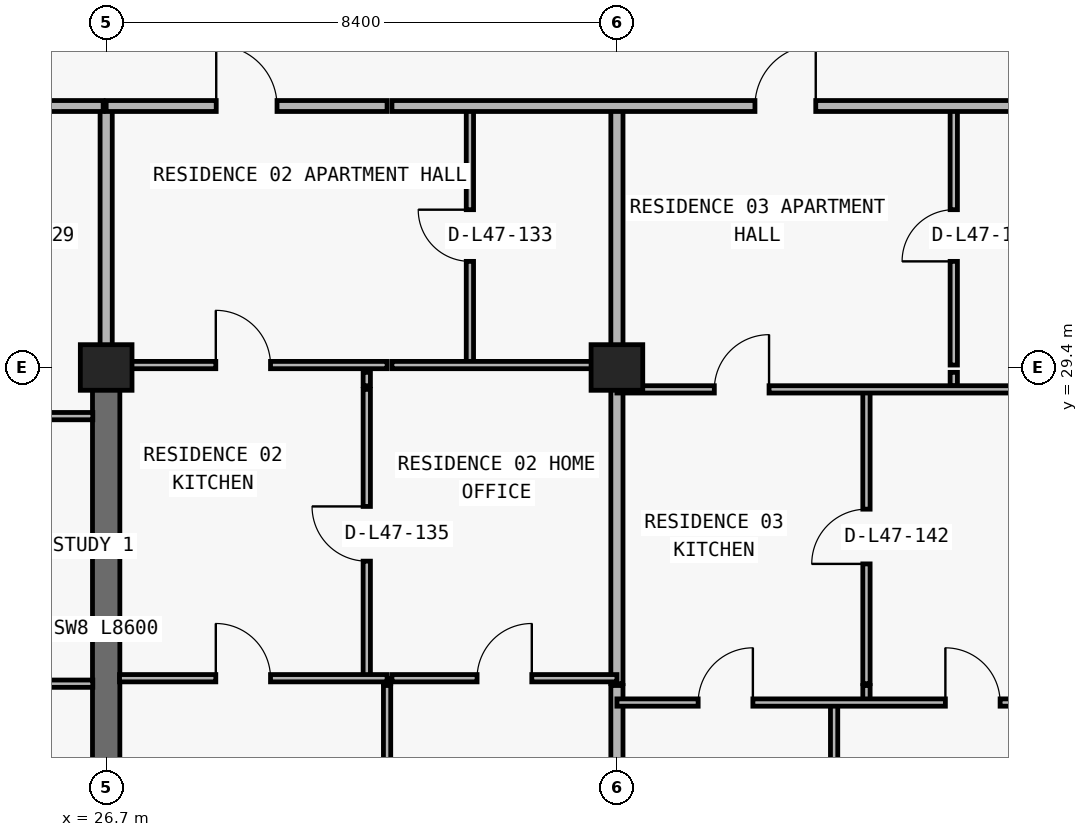
"""IFC4 building model, lengths in metres.
Left out: names, types, materials, properties, quantities, classifications, styles, units other than length and angle.
Written with IfcOpenShell. Run it as: python <this file> out.ifc"""

import sys

from ifc_helpers import new_model, si_unit, direction, frame, frame_2d, origin, origin_2d, place, context, subcontext, project, spatial, rectangle, extrude, element, fill, save


model = new_model("IFC4")
c1 = context("Model", 3, precision=1e-05, world=origin(), true_north=direction((0.0, 1.0)))
c2 = subcontext(c1, "Body", "Model", "MODEL_VIEW")
j1 = project(units=[si_unit("LENGTHUNIT", "METRE"), si_unit("PLANEANGLEUNIT", "RADIAN")], contexts=[c1])
p1 = place(None, origin())
s1 = spatial("IfcSite", under=j1, at=p1, CompositionType="ELEMENT")
p2 = place(p1, origin())
s2 = spatial("IfcBuilding", under=s1, at=p2, CompositionType="ELEMENT")
p3 = place(p2, frame((0.0, 0.0, 170.4)))
s3 = spatial("IfcBuildingStorey", under=s2, at=p3, CompositionType="ELEMENT", Elevation=170.4)
for number, where, z_axis, x_axis in (
    (1, (26.7, 29.4, 0.0), (0.0, 0.0, 1.0), (1.0, 0.0, 0.0)),
    (2, (35.1, 29.4, 0.0), (0.0, 0.0, 1.0), (1.0, 0.0, 0.0)),
):
    element("IfcColumn", number, at=place(p3, frame(where, z_axis=z_axis, x_axis=x_axis)), inside=s3, PredefinedType="COLUMN", context=c2, shape_type="SweptSolid", body=[
        extrude(rectangle(XDim=0.85, YDim=0.75, at=origin_2d()), origin(), (0.0, 0.0, 1.0), 3.05),
    ])
p4 = place(p3, frame((26.7, 20.8, 0.0), z_axis=(0.0, 0.0, 1.0), x_axis=(0.0, 1.0, 0.0)))
e3 = element("IfcWall", 3, at=p4, inside=s3, PredefinedType="SHEAR", context=c2, shape_type="SweptSolid", body=[
    extrude(rectangle(XDim=8.6, YDim=0.45, at=frame_2d((4.3, 0.0))), origin(), (0.0, 0.0, 1.0), 3.05),
])
p5 = place(p3, frame((26.7, 29.44, 0.0), z_axis=(0.0, 0.0, 1.0), x_axis=(0.0, 1.0, 0.0)))
e4 = element("IfcWall", 4, at=p5, inside=s3, PredefinedType="PARTITIONING", context=c2, shape_type="SweptSolid", body=[
    extrude(rectangle(XDim=4.26, YDim=0.2, at=frame_2d((2.13, 0.0))), origin(), (0.0, 0.0, 1.0), 2.335),
])
p6 = place(p3, frame((30.986, 24.29, 0.0), z_axis=(0.0, 0.0, 1.0), x_axis=(0.0, 1.0, 0.0)))
e5 = element("IfcWall", 5, at=p6, inside=s3, PredefinedType="PARTITIONING", context=c2, shape_type="SweptSolid", body=[
    extrude(rectangle(XDim=4.75, YDim=0.12, at=frame_2d((2.375, 0.0))), origin(), (0.0, 0.0, 1.0), 2.725),
])
p7 = place(p6, frame((1.925, 0.0, 0.0)))
e6 = element("IfcOpeningElement", 6, at=p7, cuts=e5, PredefinedType="OPENING", context=c2, shape_type="SweptSolid", body=[
    extrude(rectangle(XDim=0.9, YDim=2.15, at=frame_2d((0.45, 1.075))), frame((0.0, 0.07, 0.0), z_axis=(0.0, -1.0, 0.0), x_axis=(1.0, 0.0, 0.0)), (0.0, 0.0, 1.0), 0.14),
])
p8 = place(p3, frame((30.986, 29.1, 0.0), z_axis=(0.0, 0.0, 1.0), x_axis=(0.0, 1.0, 0.0)))
e7 = element("IfcWall", 7, at=p8, inside=s3, PredefinedType="PARTITIONING", context=c2, shape_type="SweptSolid", body=[
    extrude(rectangle(XDim=0.22, YDim=0.12, at=frame_2d((0.11, 0.0))), origin(), (0.0, 0.0, 1.0), 2.725),
])
p9 = place(p3, frame((31.32, 11.24, 0.0), z_axis=(0.0, 0.0, 1.0), x_axis=(0.0, 1.0, 0.0)))
e8 = element("IfcWall", 8, at=p9, inside=s3, PredefinedType="PARTITIONING", context=c2, shape_type="SweptSolid", body=[
    extrude(rectangle(XDim=12.93, YDim=0.12, at=frame_2d((6.465, 0.0))), origin(), (0.0, 0.0, 1.0), 3.05),
])
p10 = place(p3, frame((31.32, 24.2, 0.0), z_axis=(0.0, 0.0, 1.0), x_axis=(0.0, 1.0, 0.0)))
e9 = element("IfcWall", 9, at=p10, inside=s3, PredefinedType="PARTITIONING", context=c2, shape_type="SweptSolid", body=[
    extrude(rectangle(XDim=0.09, YDim=0.12, at=frame_2d((0.045, 0.0))), origin(), (0.0, 0.0, 1.0), 3.05),
])
p11 = place(p3, frame((32.682, 29.44, 0.0), z_axis=(0.0, 0.0, 1.0), x_axis=(0.0, 1.0, 0.0)))
e10 = element("IfcWall", 10, at=p11, inside=s3, PredefinedType="PARTITIONING", context=c2, shape_type="SweptSolid", body=[
    extrude(rectangle(XDim=4.26, YDim=0.12, at=frame_2d((2.13, 0.0))), origin(), (0.0, 0.0, 1.0), 3.05),
])
p12 = place(p11, frame((1.705, 0.0, 0.0)))
e11 = element("IfcOpeningElement", 11, at=p12, cuts=e10, PredefinedType="OPENING", context=c2, shape_type="SweptSolid", body=[
    extrude(rectangle(XDim=0.85, YDim=2.1, at=frame_2d((0.425, 1.05))), frame((0.0, 0.07, 0.0), z_axis=(0.0, -1.0, 0.0), x_axis=(1.0, 0.0, 0.0)), (0.0, 0.0, 1.0), 0.14),
])
p13 = place(p3, frame((35.1, 11.24, 0.0), z_axis=(0.0, 0.0, 1.0), x_axis=(0.0, 1.0, 0.0)))
e12 = element("IfcWall", 12, at=p13, inside=s3, PredefinedType="PARTITIONING", context=c2, shape_type="SweptSolid", body=[
    extrude(rectangle(XDim=12.93, YDim=0.2, at=frame_2d((6.465, 0.0))), origin(), (0.0, 0.0, 1.0), 2.263),
])
p14 = place(p3, frame((35.1, 24.2, 0.0), z_axis=(0.0, 0.0, 1.0), x_axis=(0.0, 1.0, 0.0)))
e13 = element("IfcWall", 13, at=p14, inside=s3, PredefinedType="PARTITIONING", context=c2, shape_type="SweptSolid", body=[
    extrude(rectangle(XDim=4.84, YDim=0.2, at=frame_2d((2.42, 0.0))), origin(), (0.0, 0.0, 1.0), 2.263),
])
p15 = place(p3, frame((35.1, 29.1, 0.0), z_axis=(0.0, 0.0, 1.0), x_axis=(0.0, 1.0, 0.0)))
e14 = element("IfcWall", 14, at=p15, inside=s3, PredefinedType="PARTITIONING", context=c2, shape_type="SweptSolid", body=[
    extrude(rectangle(XDim=0.22, YDim=0.2, at=frame_2d((0.11, 0.0))), origin(), (0.0, 0.0, 1.0), 3.05),
])
p16 = place(p3, frame((35.1, 29.44, 0.0), z_axis=(0.0, 0.0, 1.0), x_axis=(0.0, 1.0, 0.0)))
e15 = element("IfcWall", 15, at=p16, inside=s3, PredefinedType="PARTITIONING", context=c2, shape_type="SweptSolid", body=[
    extrude(rectangle(XDim=4.26, YDim=0.2, at=frame_2d((2.13, 0.0))), origin(), (0.0, 0.0, 1.0), 2.263),
])
p17 = place(p3, frame((38.672, 11.24, 0.0), z_axis=(0.0, 0.0, 1.0), x_axis=(0.0, 1.0, 0.0)))
e16 = element("IfcWall", 16, at=p17, inside=s3, PredefinedType="PARTITIONING", context=c2, shape_type="SweptSolid", body=[
    extrude(rectangle(XDim=12.65, YDim=0.12, at=frame_2d((6.325, 0.0))), origin(), (0.0, 0.0, 1.0), 3.05),
])
p18 = place(p3, frame((39.204, 23.89, 0.0), z_axis=(0.0, 0.0, 1.0), x_axis=(0.0, 1.0, 0.0)))
e17 = element("IfcWall", 17, at=p18, inside=s3, PredefinedType="PARTITIONING", context=c2, shape_type="SweptSolid", body=[
    extrude(rectangle(XDim=0.28, YDim=0.12, at=frame_2d((0.14, 0.0))), origin(), (0.0, 0.0, 1.0), 3.05),
])
p19 = place(p3, frame((39.204, 24.2, 0.0), z_axis=(0.0, 0.0, 1.0), x_axis=(0.0, 1.0, 0.0)))
e18 = element("IfcWall", 18, at=p19, inside=s3, PredefinedType="PARTITIONING", context=c2, shape_type="SweptSolid", body=[
    extrude(rectangle(XDim=4.84, YDim=0.12, at=frame_2d((2.42, 0.0))), origin(), (0.0, 0.0, 1.0), 3.05),
])
p20 = place(p19, frame((1.97, 0.0, 0.0)))
e19 = element("IfcOpeningElement", 19, at=p20, cuts=e18, PredefinedType="OPENING", context=c2, shape_type="SweptSolid", body=[
    extrude(rectangle(XDim=0.9, YDim=2.15, at=frame_2d((0.45, 1.075))), frame((0.0, 0.07, 0.0), z_axis=(0.0, -1.0, 0.0), x_axis=(1.0, 0.0, 0.0)), (0.0, 0.0, 1.0), 0.14),
])
p21 = place(p3, frame((40.64, 29.1, 0.0), z_axis=(0.0, 0.0, 1.0), x_axis=(0.0, 1.0, 0.0)))
e20 = element("IfcWall", 20, at=p21, inside=s3, PredefinedType="PARTITIONING", context=c2, shape_type="SweptSolid", body=[
    extrude(rectangle(XDim=0.22, YDim=0.12, at=frame_2d((0.11, 0.0))), origin(), (0.0, 0.0, 1.0), 3.05),
])
p22 = place(p3, frame((40.64, 29.44, 0.0), z_axis=(0.0, 0.0, 1.0), x_axis=(0.0, 1.0, 0.0)))
e21 = element("IfcWall", 21, at=p22, inside=s3, PredefinedType="PARTITIONING", context=c2, shape_type="SweptSolid", body=[
    extrude(rectangle(XDim=4.26, YDim=0.12, at=frame_2d((2.13, 0.0))), origin(), (0.0, 0.0, 1.0), 3.05),
])
p23 = place(p22, frame((1.705, 0.0, 0.0)))
e22 = element("IfcOpeningElement", 22, at=p23, cuts=e21, PredefinedType="OPENING", context=c2, shape_type="SweptSolid", body=[
    extrude(rectangle(XDim=0.85, YDim=2.1, at=frame_2d((0.425, 1.05))), frame((0.0, 0.07, 0.0), z_axis=(0.0, -1.0, 0.0), x_axis=(1.0, 0.0, 0.0)), (0.0, 0.0, 1.0), 0.14),
])
p24 = place(p3, frame((35.1, 23.89, 0.0), z_axis=(0.0, 0.0, 1.0), x_axis=(1.0, 0.0, 0.0)))
e23 = element("IfcWall", 23, at=p24, inside=s3, PredefinedType="PARTITIONING", context=c2, shape_type="SweptSolid", body=[
    extrude(rectangle(XDim=7.6, YDim=0.12, at=frame_2d((3.8, 0.0))), origin(), (0.0, 0.0, 1.0), 3.05),
])
p25 = place(p24, frame((1.336, 0.0, 0.0)))
e24 = element("IfcOpeningElement", 24, at=p25, cuts=e23, PredefinedType="OPENING", context=c2, shape_type="SweptSolid", body=[
    extrude(rectangle(XDim=0.9, YDim=2.15, at=frame_2d((0.45, 1.075))), frame((0.0, 0.07, 0.0), z_axis=(0.0, -1.0, 0.0), x_axis=(1.0, 0.0, 0.0)), (0.0, 0.0, 1.0), 0.14),
])
p26 = place(p24, frame((5.402, 0.0, 0.0)))
e25 = element("IfcOpeningElement", 25, at=p26, cuts=e23, PredefinedType="OPENING", context=c2, shape_type="SweptSolid", body=[
    extrude(rectangle(XDim=0.9, YDim=2.15, at=frame_2d((0.45, 1.075))), frame((0.0, 0.07, 0.0), z_axis=(0.0, -1.0, 0.0), x_axis=(1.0, 0.0, 0.0)), (0.0, 0.0, 1.0), 0.14),
])
p27 = place(p3, frame((18.3, 24.2, 0.0), z_axis=(0.0, 0.0, 1.0), x_axis=(1.0, 0.0, 0.0)))
e26 = element("IfcWall", 26, at=p27, inside=s3, PredefinedType="PARTITIONING", context=c2, shape_type="SweptSolid", body=[
    extrude(rectangle(XDim=8.18, YDim=0.12, at=frame_2d((4.09, 0.0))), origin(), (0.0, 0.0, 1.0), 3.05),
])
p28 = place(p27, frame((3.64, 0.0, 0.0)))
e27 = element("IfcOpeningElement", 27, at=p28, cuts=e26, PredefinedType="OPENING", context=c2, shape_type="SweptSolid", body=[
    extrude(rectangle(XDim=0.9, YDim=2.15, at=frame_2d((0.45, 1.075))), frame((0.0, 0.07, 0.0), z_axis=(0.0, -1.0, 0.0), x_axis=(1.0, 0.0, 0.0)), (0.0, 0.0, 1.0), 0.14),
])
p29 = place(p3, frame((26.92, 24.29, 0.0), z_axis=(0.0, 0.0, 1.0), x_axis=(1.0, 0.0, 0.0)))
e28 = element("IfcWall", 28, at=p29, inside=s3, PredefinedType="PARTITIONING", context=c2, shape_type="SweptSolid", body=[
    extrude(rectangle(XDim=4.4, YDim=0.12, at=frame_2d((2.2, 0.0))), origin(), (0.0, 0.0, 1.0), 3.05),
])
p30 = place(p29, frame((1.583, 0.0, 0.0)))
e29 = element("IfcOpeningElement", 29, at=p30, cuts=e28, PredefinedType="OPENING", context=c2, shape_type="SweptSolid", body=[
    extrude(rectangle(XDim=0.9, YDim=2.15, at=frame_2d((0.45, 1.075))), frame((0.0, 0.07, 0.0), z_axis=(0.0, -1.0, 0.0), x_axis=(1.0, 0.0, 0.0)), (0.0, 0.0, 1.0), 0.14),
])
p31 = place(p3, frame((31.4, 24.29, 0.0), z_axis=(0.0, 0.0, 1.0), x_axis=(1.0, 0.0, 0.0)))
e30 = element("IfcWall", 30, at=p31, inside=s3, PredefinedType="PARTITIONING", context=c2, shape_type="SweptSolid", body=[
    extrude(rectangle(XDim=3.7, YDim=0.12, at=frame_2d((1.85, 0.0))), origin(), (0.0, 0.0, 1.0), 3.05),
])
p32 = place(p31, frame((1.4, 0.0, 0.0)))
e31 = element("IfcOpeningElement", 31, at=p32, cuts=e30, PredefinedType="OPENING", context=c2, shape_type="SweptSolid", body=[
    extrude(rectangle(XDim=0.9, YDim=2.15, at=frame_2d((0.45, 1.075))), frame((0.0, 0.07, 0.0), z_axis=(0.0, -1.0, 0.0), x_axis=(1.0, 0.0, 0.0)), (0.0, 0.0, 1.0), 0.14),
])
p33 = place(p3, frame((18.3, 28.6, 0.0), z_axis=(0.0, 0.0, 1.0), x_axis=(1.0, 0.0, 0.0)))
e32 = element("IfcWall", 32, at=p33, inside=s3, PredefinedType="PARTITIONING", context=c2, shape_type="SweptSolid", body=[
    extrude(rectangle(XDim=8.18, YDim=0.12, at=frame_2d((4.09, 0.0))), origin(), (0.0, 0.0, 1.0), 3.05),
])
p34 = place(p33, frame((2.809, 0.0, 0.0)))
e33 = element("IfcOpeningElement", 33, at=p34, cuts=e32, PredefinedType="OPENING", context=c2, shape_type="SweptSolid", body=[
    extrude(rectangle(XDim=0.9, YDim=2.15, at=frame_2d((0.45, 1.075))), frame((0.0, 0.07, 0.0), z_axis=(0.0, -1.0, 0.0), x_axis=(1.0, 0.0, 0.0)), (0.0, 0.0, 1.0), 0.14),
])
p35 = place(p3, frame((35.1, 29.04, 0.0), z_axis=(0.0, 0.0, 1.0), x_axis=(1.0, 0.0, 0.0)))
e34 = element("IfcWall", 34, at=p35, inside=s3, PredefinedType="PARTITIONING", context=c2, shape_type="SweptSolid", body=[
    extrude(rectangle(XDim=7.6, YDim=0.12, at=frame_2d((3.8, 0.0))), origin(), (0.0, 0.0, 1.0), 3.05),
])
p36 = place(p35, frame((1.602, 0.0, 0.0)))
e35 = element("IfcOpeningElement", 35, at=p36, cuts=e34, PredefinedType="OPENING", context=c2, shape_type="SweptSolid", body=[
    extrude(rectangle(XDim=0.9, YDim=2.15, at=frame_2d((0.45, 1.075))), frame((0.0, 0.07, 0.0), z_axis=(0.0, -1.0, 0.0), x_axis=(1.0, 0.0, 0.0)), (0.0, 0.0, 1.0), 0.14),
])
p37 = place(p3, frame((26.92, 29.44, 0.0), z_axis=(0.0, 0.0, 1.0), x_axis=(1.0, 0.0, 0.0)))
e36 = element("IfcWall", 36, at=p37, inside=s3, PredefinedType="PARTITIONING", context=c2, shape_type="SweptSolid", body=[
    extrude(rectangle(XDim=4.4, YDim=0.12, at=frame_2d((2.2, 0.0))), origin(), (0.0, 0.0, 1.0), 2.263),
])
p38 = place(p37, frame((1.583, 0.0, 0.0)))
e37 = element("IfcOpeningElement", 37, at=p38, cuts=e36, PredefinedType="OPENING", context=c2, shape_type="SweptSolid", body=[
    extrude(rectangle(XDim=0.9, YDim=2.15, at=frame_2d((0.45, 1.075))), frame((0.0, 0.07, 0.0), z_axis=(0.0, -1.0, 0.0), x_axis=(1.0, 0.0, 0.0)), (0.0, 0.0, 1.0), 0.14),
])
p39 = place(p3, frame((31.4, 29.44, 0.0), z_axis=(0.0, 0.0, 1.0), x_axis=(1.0, 0.0, 0.0)))
e38 = element("IfcWall", 38, at=p39, inside=s3, PredefinedType="PARTITIONING", context=c2, shape_type="SweptSolid", body=[
    extrude(rectangle(XDim=3.7, YDim=0.12, at=frame_2d((1.85, 0.0))), origin(), (0.0, 0.0, 1.0), 2.263),
])
p40 = place(p3, frame((18.3, 33.7, 0.0), z_axis=(0.0, 0.0, 1.0), x_axis=(1.0, 0.0, 0.0)))
e39 = element("IfcWall", 39, at=p40, inside=s3, PredefinedType="PARTITIONING", context=c2, shape_type="SweptSolid", body=[
    extrude(rectangle(XDim=8.35, YDim=0.18, at=frame_2d((4.175, 0.0))), origin(), (0.0, 0.0, 1.0), 3.05),
])
p41 = place(p3, frame((26.7, 33.7, 0.0), z_axis=(0.0, 0.0, 1.0), x_axis=(1.0, 0.0, 0.0)))
e40 = element("IfcWall", 40, at=p41, inside=s3, PredefinedType="PARTITIONING", context=c2, shape_type="SweptSolid", body=[
    extrude(rectangle(XDim=4.62, YDim=0.18, at=frame_2d((2.31, 0.0))), origin(), (0.0, 0.0, 1.0), 3.05),
])
p42 = place(p41, frame((1.81, 0.0, 0.0)))
e41 = element("IfcOpeningElement", 41, at=p42, cuts=e40, PredefinedType="OPENING", context=c2, shape_type="SweptSolid", body=[
    extrude(rectangle(XDim=1.0, YDim=2.2, at=frame_2d((0.5, 1.1))), frame((0.0, 0.1, 0.0), z_axis=(0.0, -1.0, 0.0), x_axis=(1.0, 0.0, 0.0)), (0.0, 0.0, 1.0), 0.2),
])
p43 = place(p3, frame((31.4, 33.7, 0.0), z_axis=(0.0, 0.0, 1.0), x_axis=(1.0, 0.0, 0.0)))
e42 = element("IfcWall", 42, at=p43, inside=s3, PredefinedType="PARTITIONING", context=c2, shape_type="SweptSolid", body=[
    extrude(rectangle(XDim=28.1, YDim=0.18, at=frame_2d((14.05, 0.0))), origin(), (0.0, 0.0, 1.0), 3.05),
])
p44 = place(p43, frame((5.97, 0.0, 0.0)))
e43 = element("IfcOpeningElement", 43, at=p44, cuts=e42, PredefinedType="OPENING", context=c2, shape_type="SweptSolid", body=[
    extrude(rectangle(XDim=1.0, YDim=2.2, at=frame_2d((0.5, 1.1))), frame((0.0, 0.1, 0.0), z_axis=(0.0, -1.0, 0.0), x_axis=(1.0, 0.0, 0.0)), (0.0, 0.0, 1.0), 0.2),
])
p45 = place(p43, frame((13.824, 0.0, 0.0)))
e44 = element("IfcOpeningElement", 44, at=p45, cuts=e42, PredefinedType="OPENING", context=c2, shape_type="SweptSolid", body=[
    extrude(rectangle(XDim=1.0, YDim=2.2, at=frame_2d((0.5, 1.1))), frame((0.0, 0.1, 0.0), z_axis=(0.0, -1.0, 0.0), x_axis=(1.0, 0.0, 0.0)), (0.0, 0.0, 1.0), 0.2),
])
p46 = place(p43, frame((22.349, 0.0, 0.0)))
e45 = element("IfcOpeningElement", 45, at=p46, cuts=e42, PredefinedType="OPENING", context=c2, shape_type="SweptSolid", body=[
    extrude(rectangle(XDim=1.0, YDim=2.2, at=frame_2d((0.5, 1.1))), frame((0.0, 0.1, 0.0), z_axis=(0.0, -1.0, 0.0), x_axis=(1.0, 0.0, 0.0)), (0.0, 0.0, 1.0), 0.2),
])
p47 = place(p42, origin())
e46 = element("IfcDoor", 46, at=p47, inside=s3, OperationType="SINGLE_SWING_LEFT", PredefinedType="DOOR", context=c2, shape_type="SweptSolid", body=[
    extrude(rectangle(XDim=1.0, YDim=2.2, at=frame_2d((0.5, 1.1))), frame((0.0, 0.025, 0.0), z_axis=(0.0, -1.0, 0.0), x_axis=(1.0, 0.0, 0.0)), (0.0, 0.0, 1.0), 0.05),
])
fill(e41, e46)
p48 = place(p12, origin())
e47 = element("IfcDoor", 47, at=p48, inside=s3, OperationType="SINGLE_SWING_RIGHT", PredefinedType="DOOR", context=c2, shape_type="SweptSolid", body=[
    extrude(rectangle(XDim=0.85, YDim=2.1, at=frame_2d((0.425, 1.05))), frame((0.0, 0.025, 0.0), z_axis=(0.0, -1.0, 0.0), x_axis=(1.0, 0.0, 0.0)), (0.0, 0.0, 1.0), 0.05),
])
fill(e11, e47)
p49 = place(p38, origin())
e48 = element("IfcDoor", 48, at=p49, inside=s3, OperationType="SINGLE_SWING_LEFT", PredefinedType="DOOR", context=c2, shape_type="SweptSolid", body=[
    extrude(rectangle(XDim=0.9, YDim=2.15, at=frame_2d((0.45, 1.075))), frame((0.0, 0.025, 0.0), z_axis=(0.0, -1.0, 0.0), x_axis=(1.0, 0.0, 0.0)), (0.0, 0.0, 1.0), 0.05),
])
fill(e37, e48)
p50 = place(p7, origin())
e49 = element("IfcDoor", 49, at=p50, inside=s3, OperationType="SINGLE_SWING_RIGHT", PredefinedType="DOOR", context=c2, shape_type="SweptSolid", body=[
    extrude(rectangle(XDim=0.9, YDim=2.15, at=frame_2d((0.45, 1.075))), frame((0.0, 0.025, 0.0), z_axis=(0.0, -1.0, 0.0), x_axis=(1.0, 0.0, 0.0)), (0.0, 0.0, 1.0), 0.05),
])
fill(e6, e49)
p51 = place(p30, origin())
e50 = element("IfcDoor", 50, at=p51, inside=s3, OperationType="SINGLE_SWING_LEFT", PredefinedType="DOOR", context=c2, shape_type="SweptSolid", body=[
    extrude(rectangle(XDim=0.9, YDim=2.15, at=frame_2d((0.45, 1.075))), frame((0.0, 0.025, 0.0), z_axis=(0.0, -1.0, 0.0), x_axis=(1.0, 0.0, 0.0)), (0.0, 0.0, 1.0), 0.05),
])
fill(e29, e50)
p52 = place(p32, origin())
e51 = element("IfcDoor", 51, at=p52, inside=s3, OperationType="SINGLE_SWING_RIGHT", PredefinedType="DOOR", context=c2, shape_type="SweptSolid", body=[
    extrude(rectangle(XDim=0.9, YDim=2.15, at=frame_2d((0.45, 1.075))), frame((0.0, 0.025, 0.0), z_axis=(0.0, -1.0, 0.0), x_axis=(1.0, 0.0, 0.0)), (0.0, 0.0, 1.0), 0.05),
])
fill(e31, e51)
p53 = place(p44, origin())
e52 = element("IfcDoor", 52, at=p53, inside=s3, OperationType="SINGLE_SWING_RIGHT", PredefinedType="DOOR", context=c2, shape_type="SweptSolid", body=[
    extrude(rectangle(XDim=1.0, YDim=2.2, at=frame_2d((0.5, 1.1))), frame((0.0, 0.025, 0.0), z_axis=(0.0, -1.0, 0.0), x_axis=(1.0, 0.0, 0.0)), (0.0, 0.0, 1.0), 0.05),
])
fill(e43, e52)
p54 = place(p23, origin())
e53 = element("IfcDoor", 53, at=p54, inside=s3, OperationType="SINGLE_SWING_LEFT", PredefinedType="DOOR", context=c2, shape_type="SweptSolid", body=[
    extrude(rectangle(XDim=0.85, YDim=2.1, at=frame_2d((0.425, 1.05))), frame((0.0, 0.025, 0.0), z_axis=(0.0, -1.0, 0.0), x_axis=(1.0, 0.0, 0.0)), (0.0, 0.0, 1.0), 0.05),
])
fill(e22, e53)
p55 = place(p36, origin())
e54 = element("IfcDoor", 54, at=p55, inside=s3, OperationType="SINGLE_SWING_RIGHT", PredefinedType="DOOR", context=c2, shape_type="SweptSolid", body=[
    extrude(rectangle(XDim=0.9, YDim=2.15, at=frame_2d((0.45, 1.075))), frame((0.0, 0.025, 0.0), z_axis=(0.0, -1.0, 0.0), x_axis=(1.0, 0.0, 0.0)), (0.0, 0.0, 1.0), 0.05),
])
fill(e35, e54)
p56 = place(p20, origin())
e55 = element("IfcDoor", 55, at=p56, inside=s3, OperationType="SINGLE_SWING_LEFT", PredefinedType="DOOR", context=c2, shape_type="SweptSolid", body=[
    extrude(rectangle(XDim=0.9, YDim=2.15, at=frame_2d((0.45, 1.075))), frame((0.0, 0.025, 0.0), z_axis=(0.0, -1.0, 0.0), x_axis=(1.0, 0.0, 0.0)), (0.0, 0.0, 1.0), 0.05),
])
fill(e19, e55)
p57 = place(p25, origin())
e56 = element("IfcDoor", 56, at=p57, inside=s3, OperationType="SINGLE_SWING_RIGHT", PredefinedType="DOOR", context=c2, shape_type="SweptSolid", body=[
    extrude(rectangle(XDim=0.9, YDim=2.15, at=frame_2d((0.45, 1.075))), frame((0.0, 0.025, 0.0), z_axis=(0.0, -1.0, 0.0), x_axis=(1.0, 0.0, 0.0)), (0.0, 0.0, 1.0), 0.05),
])
fill(e24, e56)
p58 = place(p26, origin())
e57 = element("IfcDoor", 57, at=p58, inside=s3, OperationType="SINGLE_SWING_LEFT", PredefinedType="DOOR", context=c2, shape_type="SweptSolid", body=[
    extrude(rectangle(XDim=0.9, YDim=2.15, at=frame_2d((0.45, 1.075))), frame((0.0, 0.025, 0.0), z_axis=(0.0, -1.0, 0.0), x_axis=(1.0, 0.0, 0.0)), (0.0, 0.0, 1.0), 0.05),
])
fill(e25, e57)
save(model, sys.argv[1])
